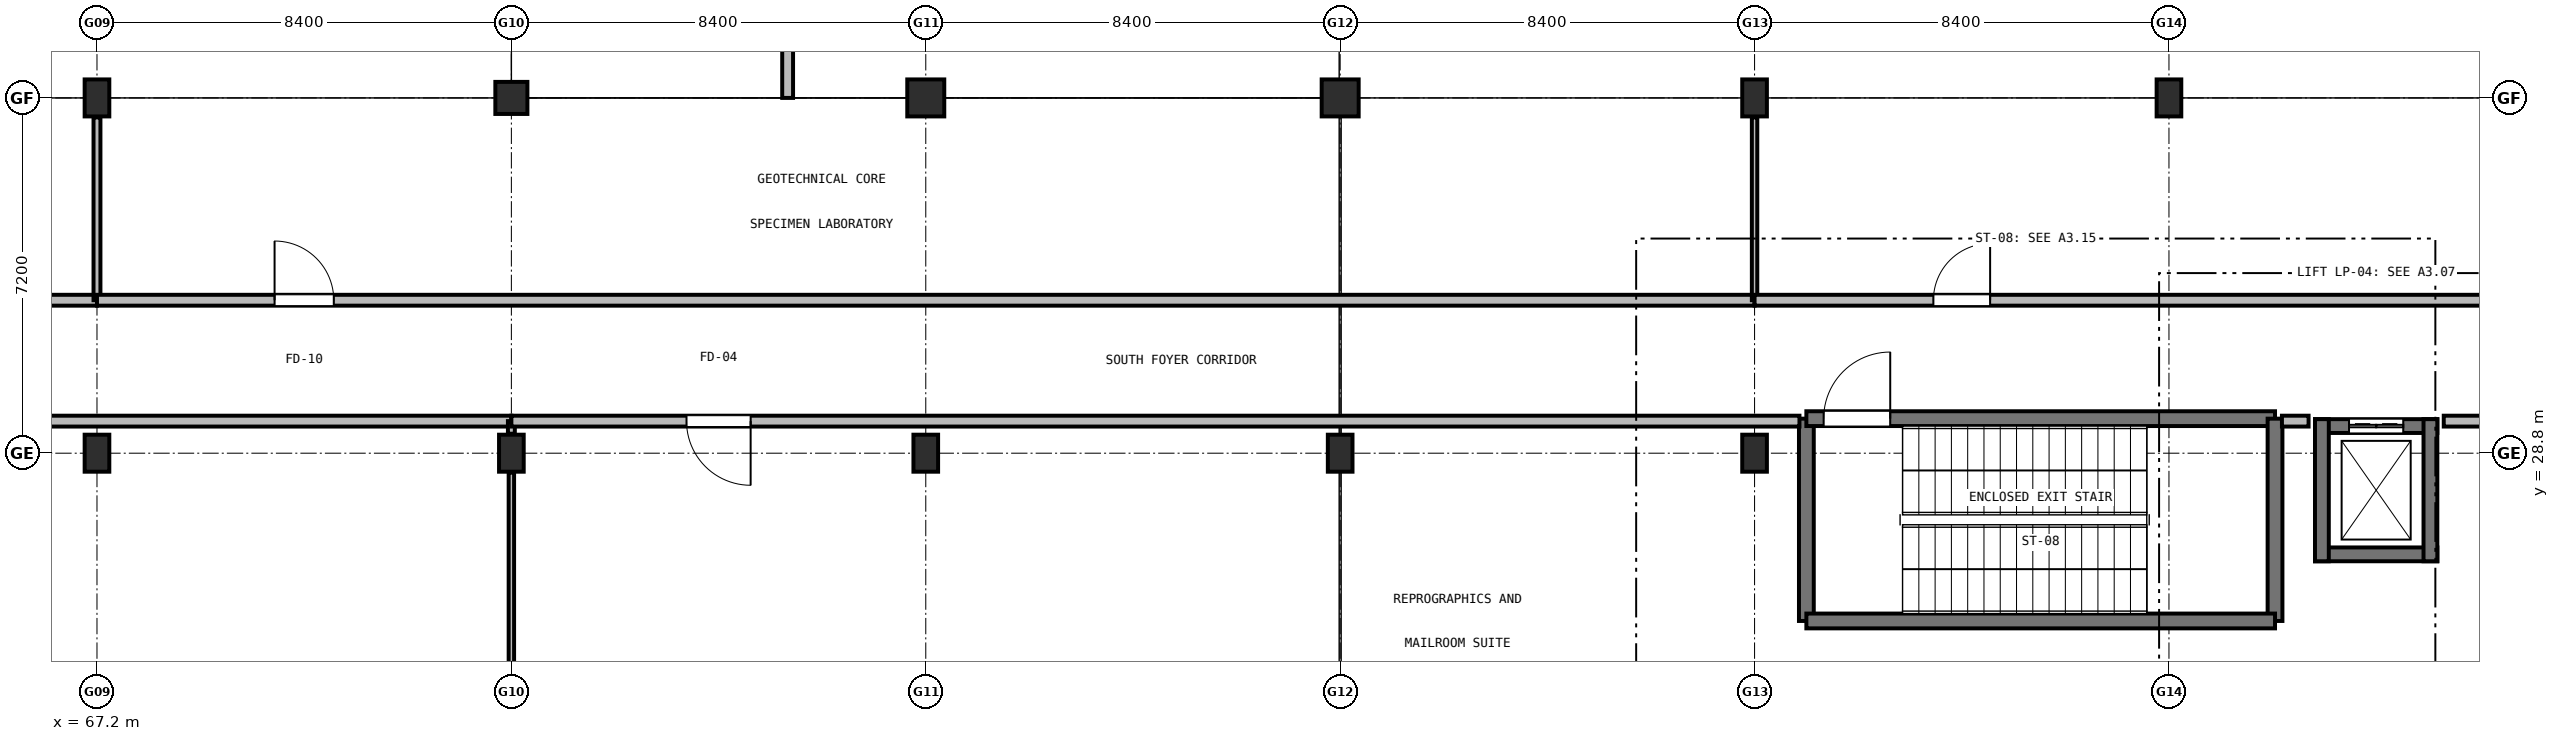
"""IFC4 building model, lengths in metres.
Left out: names, types, materials, properties, quantities, classifications, styles, units other than length and angle.
Written with IfcOpenShell. Run it as: python <this file> out.ifc"""

import sys

from ifc_helpers import new_model, si_unit, direction, frame, frame_2d, origin, origin_2d, place, context, subcontext, project, spatial, rectangle, extrude, element, fill, save


model = new_model("IFC4")
c1 = context("Model", 3, precision=1e-05, world=origin(), true_north=direction((0.0, 1.0)))
c2 = subcontext(c1, "Body", "Model", "MODEL_VIEW")
j1 = project(units=[si_unit("LENGTHUNIT", "METRE"), si_unit("PLANEANGLEUNIT", "RADIAN")], contexts=[c1])
p1 = place(None, origin())
s1 = spatial("IfcSite", under=j1, at=p1, CompositionType="ELEMENT")
p2 = place(p1, origin())
s2 = spatial("IfcBuilding", under=s1, at=p2, CompositionType="ELEMENT")
p3 = place(p2, frame((0.0, 0.0, -4.8)))
s3 = spatial("IfcBuildingStorey", under=s2, at=p3, CompositionType="ELEMENT", Elevation=-4.8)
for number, where, z_axis, x_axis in (
    (1, (67.2, 28.8, 0.0), (0.0, 0.0, 1.0), (1.0, 0.0, 0.0)),
    (2, (67.2, 36.0, 0.0), (0.0, 0.0, 1.0), (1.0, 0.0, 0.0)),
    (3, (75.6, 28.8, 0.0), (0.0, 0.0, 1.0), (1.0, 0.0, 0.0)),
):
    element("IfcColumn", number, at=place(p3, frame(where, z_axis=z_axis, x_axis=x_axis)), inside=s3, PredefinedType="COLUMN", context=c2, shape_type="SweptSolid", body=[
        extrude(rectangle(XDim=0.5, YDim=0.75, at=origin_2d()), origin(), (0.0, 0.0, 1.0), 4.8),
    ])
p4 = place(p3, frame((75.6, 36.0, 0.0), z_axis=(0.0, 0.0, 1.0), x_axis=(1.0, 0.0, 0.0)))
e4 = element("IfcColumn", 4, at=p4, inside=s3, PredefinedType="COLUMN", context=c2, shape_type="SweptSolid", body=[
    extrude(rectangle(XDim=0.65, YDim=0.65, at=origin_2d()), origin(), (0.0, 0.0, 1.0), 4.8),
])
p5 = place(p3, frame((84.0, 28.8, 0.0), z_axis=(0.0, 0.0, 1.0), x_axis=(1.0, 0.0, 0.0)))
e5 = element("IfcColumn", 5, at=p5, inside=s3, PredefinedType="COLUMN", context=c2, shape_type="SweptSolid", body=[
    extrude(rectangle(XDim=0.5, YDim=0.75, at=origin_2d()), origin(), (0.0, 0.0, 1.0), 4.8),
])
p6 = place(p3, frame((84.0, 36.0, 0.0), z_axis=(0.0, 0.0, 1.0), x_axis=(1.0, 0.0, 0.0)))
e6 = element("IfcColumn", 6, at=p6, inside=s3, PredefinedType="COLUMN", context=c2, shape_type="SweptSolid", body=[
    extrude(rectangle(XDim=0.75, YDim=0.75, at=origin_2d()), origin(), (0.0, 0.0, 1.0), 4.8),
])
p7 = place(p3, frame((92.4, 28.8, 0.0), z_axis=(0.0, 0.0, 1.0), x_axis=(1.0, 0.0, 0.0)))
e7 = element("IfcColumn", 7, at=p7, inside=s3, PredefinedType="COLUMN", context=c2, shape_type="SweptSolid", body=[
    extrude(rectangle(XDim=0.5, YDim=0.75, at=origin_2d()), origin(), (0.0, 0.0, 1.0), 4.8),
])
p8 = place(p3, frame((92.4, 36.0, 0.0), z_axis=(0.0, 0.0, 1.0), x_axis=(1.0, 0.0, 0.0)))
e8 = element("IfcColumn", 8, at=p8, inside=s3, PredefinedType="COLUMN", context=c2, shape_type="SweptSolid", body=[
    extrude(rectangle(XDim=0.75, YDim=0.75, at=origin_2d()), origin(), (0.0, 0.0, 1.0), 4.8),
])
for number, where, z_axis, x_axis in (
    (9, (100.8, 28.8, 0.0), (0.0, 0.0, 1.0), (1.0, 0.0, 0.0)),
    (10, (100.8, 36.0, 0.0), (0.0, 0.0, 1.0), (1.0, 0.0, 0.0)),
    (11, (109.2, 36.0, 0.0), (0.0, 0.0, 1.0), (1.0, 0.0, 0.0)),
):
    element("IfcColumn", number, at=place(p3, frame(where, z_axis=z_axis, x_axis=x_axis)), inside=s3, PredefinedType="COLUMN", context=c2, shape_type="SweptSolid", body=[
        extrude(rectangle(XDim=0.5, YDim=0.75, at=origin_2d()), origin(), (0.0, 0.0, 1.0), 4.8),
    ])
p9 = place(p3, frame((101.85, 25.4, 0.0), z_axis=(0.0, 0.0, 1.0), x_axis=(0.0, 1.0, 0.0)))
e12 = element("IfcWall", 12, at=p9, inside=s3, PredefinedType="SHEAR", context=c2, shape_type="SweptSolid", body=[
    extrude(rectangle(XDim=4.1, YDim=0.3, at=frame_2d((2.05, 0.0))), origin(), (0.0, 0.0, 1.0), 4.5),
])
p10 = place(p3, frame((101.85, 29.5, 0.0), z_axis=(0.0, 0.0, 1.0), x_axis=(1.0, 0.0, 0.0)))
e13 = element("IfcWall", 13, at=p10, inside=s3, PredefinedType="SHEAR", context=c2, shape_type="SweptSolid", body=[
    extrude(rectangle(XDim=9.5, YDim=0.3, at=frame_2d((4.75, 0.0))), origin(), (0.0, 0.0, 1.0), 4.5),
])
p11 = place(p10, frame((0.35, 0.0, 0.0)))
e14 = element("IfcOpeningElement", 14, at=p11, cuts=e13, PredefinedType="OPENING", context=c2, shape_type="SweptSolid", body=[
    extrude(rectangle(XDim=1.35, YDim=2.2, at=frame_2d((0.675, 1.1))), frame((0.0, 0.16, 0.0), z_axis=(0.0, -1.0, 0.0), x_axis=(1.0, 0.0, 0.0)), (0.0, 0.0, 1.0), 0.32),
])
p12 = place(p3, frame((111.35, 29.5, 0.0), z_axis=(0.0, 0.0, 1.0), x_axis=(0.0, -1.0, 0.0)))
e15 = element("IfcWall", 15, at=p12, inside=s3, PredefinedType="SHEAR", context=c2, shape_type="SweptSolid", body=[
    extrude(rectangle(XDim=4.1, YDim=0.3, at=frame_2d((2.05, 0.0))), origin(), (0.0, 0.0, 1.0), 4.5),
])
p13 = place(p3, frame((111.35, 25.4, 0.0), z_axis=(0.0, 0.0, 1.0), x_axis=(-1.0, 0.0, 0.0)))
e16 = element("IfcWall", 16, at=p13, inside=s3, PredefinedType="SHEAR", context=c2, shape_type="SweptSolid", body=[
    extrude(rectangle(XDim=9.5, YDim=0.3, at=frame_2d((4.75, 0.0))), origin(), (0.0, 0.0, 1.0), 4.5),
])
p14 = place(p3, frame((114.64, 26.75, 0.0), z_axis=(0.0, 0.0, 1.0), x_axis=(-1.0, 0.0, 0.0)))
e17 = element("IfcWall", 17, at=p14, inside=s3, PredefinedType="SHEAR", context=c2, shape_type="SweptSolid", body=[
    extrude(rectangle(XDim=2.48, YDim=0.28, at=frame_2d((1.24, 0.0))), origin(), (0.0, 0.0, 1.0), 4.5),
])
p15 = place(p3, frame((112.16, 29.35, 0.0), z_axis=(0.0, 0.0, 1.0), x_axis=(1.0, 0.0, 0.0)))
e18 = element("IfcWall", 18, at=p15, inside=s3, PredefinedType="SHEAR", context=c2, shape_type="SweptSolid", body=[
    extrude(rectangle(XDim=2.48, YDim=0.28, at=frame_2d((1.24, 0.0))), origin(), (0.0, 0.0, 1.0), 4.5),
])
p16 = place(p15, frame((0.69, 0.0, 0.0)))
e19 = element("IfcOpeningElement", 19, at=p16, cuts=e18, PredefinedType="OPENING", context=c2, shape_type="SweptSolid", body=[
    extrude(rectangle(XDim=1.1, YDim=2.15, at=frame_2d((0.55, 1.075))), frame((0.0, 0.15, 0.0), z_axis=(0.0, -1.0, 0.0), x_axis=(1.0, 0.0, 0.0)), (0.0, 0.0, 1.0), 0.3),
])
for number, where, z_axis, x_axis in (
    (20, (112.3, 26.61, 0.0), (0.0, 0.0, 1.0), (0.0, 1.0, 0.0)),
    (21, (114.5, 29.49, 0.0), (0.0, 0.0, 1.0), (0.0, -1.0, 0.0)),
):
    element("IfcWall", number, at=place(p3, frame(where, z_axis=z_axis, x_axis=x_axis)), inside=s3, PredefinedType="SHEAR", context=c2, shape_type="SweptSolid", body=[
        extrude(rectangle(XDim=2.88, YDim=0.28, at=frame_2d((1.44, 0.0))), origin(), (0.0, 0.0, 1.0), 4.5),
    ])
p17 = place(p3, frame((81.2, 36.0, 0.0), z_axis=(0.0, 0.0, 1.0), x_axis=(0.0, 1.0, 0.0)))
e22 = element("IfcWall", 22, at=p17, inside=s3, PredefinedType="SOLIDWALL", context=c2, shape_type="SweptSolid", body=[
    extrude(rectangle(XDim=14.4, YDim=0.22, at=frame_2d((7.2, 0.0))), origin(), (0.0, 0.0, 1.0), 3.635),
])
p18 = place(p17, frame((6.3, 0.0, 0.0)))
e23 = element("IfcOpeningElement", 23, at=p18, cuts=e22, PredefinedType="OPENING", context=c2, shape_type="SweptSolid", body=[
    extrude(rectangle(XDim=1.8, YDim=2.2, at=frame_2d((0.9, 1.1))), frame((0.0, 0.12, 0.0), z_axis=(0.0, -1.0, 0.0), x_axis=(1.0, 0.0, 0.0)), (0.0, 0.0, 1.0), 0.24),
])
p19 = place(p3, frame((33.6, 31.9, 0.0), z_axis=(0.0, 0.0, 1.0), x_axis=(1.0, 0.0, 0.0)))
e24 = element("IfcWall", 24, at=p19, inside=s3, PredefinedType="SOLIDWALL", context=c2, shape_type="SweptSolid", body=[
    extrude(rectangle(XDim=33.6, YDim=0.22, at=frame_2d((16.8, 0.0))), origin(), (0.0, 0.0, 1.0), 3.785),
])
p20 = place(p19, frame((3.425, 0.0, 0.0)))
e25 = element("IfcOpeningElement", 25, at=p20, cuts=e24, PredefinedType="OPENING", context=c2, shape_type="SweptSolid", body=[
    extrude(rectangle(XDim=1.55, YDim=2.2, at=frame_2d((0.775, 1.1))), frame((0.0, 0.12, 0.0), z_axis=(0.0, -1.0, 0.0), x_axis=(1.0, 0.0, 0.0)), (0.0, 0.0, 1.0), 0.24),
])
p21 = place(p3, frame((67.2, 31.9, 0.0), z_axis=(0.0, 0.0, 1.0), x_axis=(0.0, 1.0, 0.0)))
e26 = element("IfcWall", 26, at=p21, inside=s3, PredefinedType="PARTITIONING", context=c2, shape_type="SweptSolid", body=[
    extrude(rectangle(XDim=3.705, YDim=0.14, at=frame_2d((1.853, 0.0))), origin(), (0.0, 0.0, 1.0), 3.635),
])
p22 = place(p3, frame((67.2, 31.9, 0.0), z_axis=(0.0, 0.0, 1.0), x_axis=(1.0, 0.0, 0.0)))
e27 = element("IfcWall", 27, at=p22, inside=s3, PredefinedType="SOLIDWALL", context=c2, shape_type="SweptSolid", body=[
    extrude(rectangle(XDim=33.6, YDim=0.22, at=frame_2d((16.8, 0.0))), origin(), (0.0, 0.0, 1.0), 3.785),
])
p23 = place(p22, frame((3.6, 0.0, 0.0)))
e28 = element("IfcOpeningElement", 28, at=p23, cuts=e27, PredefinedType="OPENING", context=c2, shape_type="SweptSolid", body=[
    extrude(rectangle(XDim=1.2, YDim=2.15, at=frame_2d((0.6, 1.075))), frame((0.0, 0.12, 0.0), z_axis=(0.0, -1.0, 0.0), x_axis=(1.0, 0.0, 0.0)), (0.0, 0.0, 1.0), 0.24),
])
p24 = place(p3, frame((100.8, 31.9, 0.0), z_axis=(0.0, 0.0, 1.0), x_axis=(0.0, 1.0, 0.0)))
e29 = element("IfcWall", 29, at=p24, inside=s3, PredefinedType="PARTITIONING", context=c2, shape_type="SweptSolid", body=[
    extrude(rectangle(XDim=3.705, YDim=0.11, at=frame_2d((1.853, 0.0))), origin(), (0.0, 0.0, 1.0), 3.635),
])
p25 = place(p3, frame((100.8, 31.9, 0.0), z_axis=(0.0, 0.0, 1.0), x_axis=(1.0, 0.0, 0.0)))
e30 = element("IfcWall", 30, at=p25, inside=s3, PredefinedType="SOLIDWALL", context=c2, shape_type="SweptSolid", body=[
    extrude(rectangle(XDim=25.2, YDim=0.22, at=frame_2d((12.6, 0.0))), origin(), (0.0, 0.0, 1.0), 3.785),
])
p26 = place(p25, frame((3.625, 0.0, 0.0)))
e31 = element("IfcOpeningElement", 31, at=p26, cuts=e30, PredefinedType="OPENING", context=c2, shape_type="SweptSolid", body=[
    extrude(rectangle(XDim=1.15, YDim=2.15, at=frame_2d((0.575, 1.075))), frame((0.0, 0.12, 0.0), z_axis=(0.0, -1.0, 0.0), x_axis=(1.0, 0.0, 0.0)), (0.0, 0.0, 1.0), 0.24),
])
p27 = place(p3, frame((75.6, 29.45, 0.0), z_axis=(0.0, 0.0, 1.0), x_axis=(-1.0, 0.0, 0.0)))
e32 = element("IfcWall", 32, at=p27, inside=s3, PredefinedType="SOLIDWALL", context=c2, shape_type="SweptSolid", body=[
    extrude(rectangle(XDim=42.0, YDim=0.22, at=frame_2d((21.0, 0.0))), origin(), (0.0, 0.0, 1.0), 3.785),
])
p28 = place(p27, frame((36.975, 0.0, 0.0)))
e33 = element("IfcOpeningElement", 33, at=p28, cuts=e32, PredefinedType="OPENING", context=c2, shape_type="SweptSolid", body=[
    extrude(rectangle(XDim=1.65, YDim=2.2, at=frame_2d((0.825, 1.1))), frame((0.0, 0.12, 0.0), z_axis=(0.0, -1.0, 0.0), x_axis=(1.0, 0.0, 0.0)), (0.0, 0.0, 1.0), 0.24),
])
p29 = place(p3, frame((75.6, 21.995, 0.0), z_axis=(0.0, 0.0, 1.0), x_axis=(0.0, 1.0, 0.0)))
e34 = element("IfcWall", 34, at=p29, inside=s3, PredefinedType="PARTITIONING", context=c2, shape_type="SweptSolid", body=[
    extrude(rectangle(XDim=6.41, YDim=0.11, at=frame_2d((3.205, 0.0))), origin(), (0.0, 0.0, 1.0), 3.635),
])
p30 = place(p3, frame((75.6, 29.195, 0.0), z_axis=(0.0, 0.0, 1.0), x_axis=(0.0, 1.0, 0.0)))
e35 = element("IfcWall", 35, at=p30, inside=s3, PredefinedType="PARTITIONING", context=c2, shape_type="SweptSolid", body=[
    extrude(rectangle(XDim=0.255, YDim=0.14, at=frame_2d((0.127, 0.0))), origin(), (0.0, 0.0, 1.0), 3.635),
])
p31 = place(p3, frame((126.0, 29.45, 0.0), z_axis=(0.0, 0.0, 1.0), x_axis=(-1.0, 0.0, 0.0)))
e36 = element("IfcWall", 36, at=p31, inside=s3, PredefinedType="SOLIDWALL", context=c2, shape_type="SweptSolid", body=[
    extrude(rectangle(XDim=11.23, YDim=0.22, at=frame_2d((5.615, 0.0))), origin(), (0.0, 0.0, 1.0), 3.785),
])
p32 = place(p3, frame((112.03, 29.45, 0.0), z_axis=(0.0, 0.0, 1.0), x_axis=(-1.0, 0.0, 0.0)))
e37 = element("IfcWall", 37, at=p32, inside=s3, PredefinedType="SOLIDWALL", context=c2, shape_type="SweptSolid", body=[
    extrude(rectangle(XDim=0.54, YDim=0.22, at=frame_2d((0.27, 0.0))), origin(), (0.0, 0.0, 1.0), 4.45),
])
p33 = place(p3, frame((101.71, 29.45, 0.0), z_axis=(0.0, 0.0, 1.0), x_axis=(-1.0, 0.0, 0.0)))
e38 = element("IfcWall", 38, at=p33, inside=s3, PredefinedType="SOLIDWALL", context=c2, shape_type="SweptSolid", body=[
    extrude(rectangle(XDim=26.11, YDim=0.22, at=frame_2d((13.055, 0.0))), origin(), (0.0, 0.0, 1.0), 3.785),
])
p34 = place(p33, frame((21.26, 0.0, 0.0)))
e39 = element("IfcOpeningElement", 39, at=p34, cuts=e38, PredefinedType="OPENING", context=c2, shape_type="SweptSolid", body=[
    extrude(rectangle(XDim=1.3, YDim=2.15, at=frame_2d((0.65, 1.075))), frame((0.0, 0.12, 0.0), z_axis=(0.0, -1.0, 0.0), x_axis=(1.0, 0.0, 0.0)), (0.0, 0.0, 1.0), 0.24),
])
p35 = place(p11, origin())
e40 = element("IfcDoor", 40, at=p35, inside=s3, OperationType="SINGLE_SWING_RIGHT", PredefinedType="DOOR", context=c2, shape_type="SweptSolid", body=[
    extrude(rectangle(XDim=1.35, YDim=2.2, at=frame_2d((0.675, 1.1))), frame((0.0, 0.025, 0.0), z_axis=(0.0, -1.0, 0.0), x_axis=(1.0, 0.0, 0.0)), (0.0, 0.0, 1.0), 0.05),
])
fill(e14, e40)
p36 = place(p16, origin())
e41 = element("IfcDoor", 41, at=p36, inside=s3, OperationType="DOUBLE_DOOR_SLIDING", PredefinedType="DOOR", context=c2, shape_type="SweptSolid", body=[
    extrude(rectangle(XDim=1.1, YDim=2.15, at=frame_2d((0.55, 1.075))), frame((0.0, 0.025, 0.0), z_axis=(0.0, -1.0, 0.0), x_axis=(1.0, 0.0, 0.0)), (0.0, 0.0, 1.0), 0.05),
])
fill(e19, e41)
p37 = place(p23, origin())
e42 = element("IfcDoor", 42, at=p37, inside=s3, OperationType="SINGLE_SWING_LEFT", PredefinedType="DOOR", context=c2, shape_type="SweptSolid", body=[
    extrude(rectangle(XDim=1.2, YDim=2.15, at=frame_2d((0.6, 1.075))), frame((0.0, 0.025, 0.0), z_axis=(0.0, -1.0, 0.0), x_axis=(1.0, 0.0, 0.0)), (0.0, 0.0, 1.0), 0.05),
])
fill(e28, e42)
p38 = place(p26, origin())
e43 = element("IfcDoor", 43, at=p38, inside=s3, OperationType="SINGLE_SWING_RIGHT", PredefinedType="DOOR", context=c2, shape_type="SweptSolid", body=[
    extrude(rectangle(XDim=1.15, YDim=2.15, at=frame_2d((0.575, 1.075))), frame((0.0, 0.025, 0.0), z_axis=(0.0, -1.0, 0.0), x_axis=(1.0, 0.0, 0.0)), (0.0, 0.0, 1.0), 0.05),
])
fill(e31, e43)
p39 = place(p34, origin())
e44 = element("IfcDoor", 44, at=p39, inside=s3, OperationType="SINGLE_SWING_LEFT", PredefinedType="DOOR", context=c2, shape_type="SweptSolid", body=[
    extrude(rectangle(XDim=1.3, YDim=2.15, at=frame_2d((0.65, 1.075))), frame((0.0, 0.025, 0.0), z_axis=(0.0, -1.0, 0.0), x_axis=(1.0, 0.0, 0.0)), (0.0, 0.0, 1.0), 0.05),
])
fill(e39, e44)
save(model, sys.argv[1])
